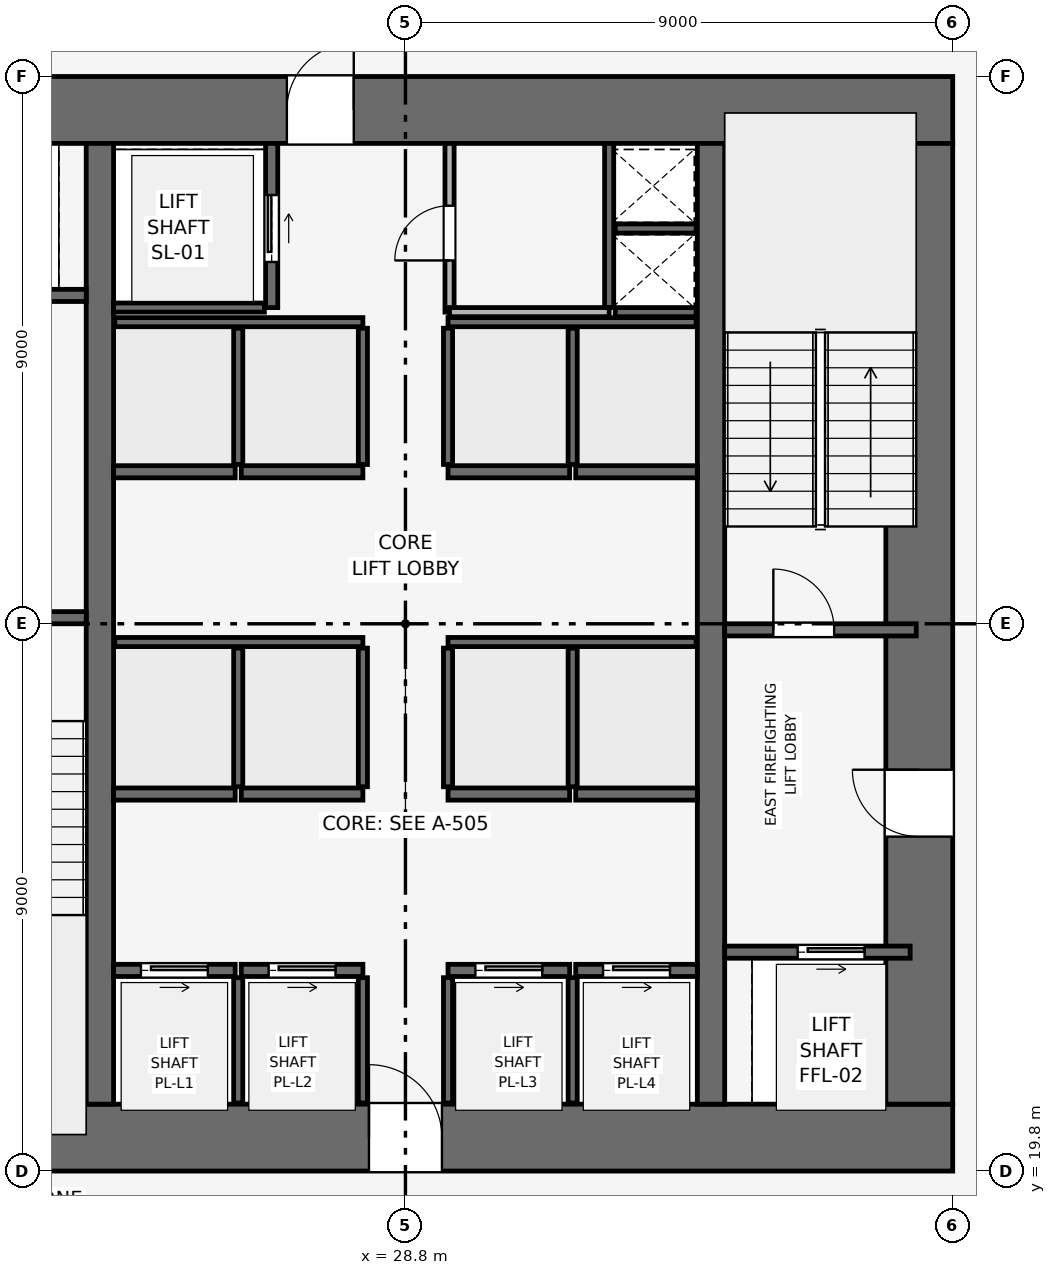
"""IFC4 building model, lengths in metres.
Left out: names, types, materials, properties, quantities, classifications, styles, units other than length and angle.
Written with IfcOpenShell. Run it as: python <this file> out.ifc"""

import sys

from ifc_helpers import new_model, si_unit, direction, frame, frame_2d, origin, place, context, subcontext, project, spatial, rectangle, extrude, element, fill, save


model = new_model("IFC4")
c1 = context("Model", 3, precision=1e-05, world=origin(), true_north=direction((0.0, 1.0)))
c2 = subcontext(c1, "Body", "Model", "MODEL_VIEW")
j1 = project(units=[si_unit("LENGTHUNIT", "METRE"), si_unit("PLANEANGLEUNIT", "RADIAN")], contexts=[c1])
p1 = place(None, origin())
s1 = spatial("IfcSite", under=j1, at=p1, CompositionType="ELEMENT")
p2 = place(p1, origin())
s2 = spatial("IfcBuilding", under=s1, at=p2, CompositionType="ELEMENT")
p3 = place(p2, frame((0.0, 0.0, 84.6)))
s3 = spatial("IfcBuildingStorey", under=s2, at=p3, CompositionType="ELEMENT", Elevation=84.6)
p4 = place(p3, frame((19.8, 20.35, 0.0), z_axis=(0.0, 0.0, 1.0), x_axis=(1.0, 0.0, 0.0)))
e1 = element("IfcWall", 1, at=p4, inside=s3, PredefinedType="SHEAR", context=c2, shape_type="SweptSolid", body=[
    extrude(rectangle(XDim=18.0, YDim=1.1, at=frame_2d((9.0, 0.0))), origin(), (0.0, 0.0, 1.0), 3.9),
])
p5 = place(p4, frame((8.4, 0.0, 0.0)))
e2 = element("IfcOpeningElement", 2, at=p5, cuts=e1, PredefinedType="OPENING", context=c2, shape_type="SweptSolid", body=[
    extrude(rectangle(XDim=1.2, YDim=2.2, at=frame_2d((0.6, 1.1))), frame((0.0, 0.56, 0.0), z_axis=(0.0, -1.0, 0.0), x_axis=(1.0, 0.0, 0.0)), (0.0, 0.0, 1.0), 1.12),
])
p6 = place(p3, frame((19.8, 37.25, 0.0), z_axis=(0.0, 0.0, 1.0), x_axis=(1.0, 0.0, 0.0)))
e3 = element("IfcWall", 3, at=p6, inside=s3, PredefinedType="SHEAR", context=c2, shape_type="SweptSolid", body=[
    extrude(rectangle(XDim=18.0, YDim=1.1, at=frame_2d((9.0, 0.0))), origin(), (0.0, 0.0, 1.0), 3.9),
])
p7 = place(p6, frame((7.05, 0.0, 0.0)))
e4 = element("IfcOpeningElement", 4, at=p7, cuts=e3, PredefinedType="OPENING", context=c2, shape_type="SweptSolid", body=[
    extrude(rectangle(XDim=1.1, YDim=2.15, at=frame_2d((0.55, 1.075))), frame((0.0, 0.56, 0.0), z_axis=(0.0, -1.0, 0.0), x_axis=(1.0, 0.0, 0.0)), (0.0, 0.0, 1.0), 1.12),
])
p8 = place(p3, frame((37.25, 20.9, 0.0), z_axis=(0.0, 0.0, 1.0), x_axis=(0.0, 1.0, 0.0)))
e5 = element("IfcWall", 5, at=p8, inside=s3, PredefinedType="SHEAR", context=c2, shape_type="SweptSolid", body=[
    extrude(rectangle(XDim=15.8, YDim=1.1, at=frame_2d((7.9, 0.0))), origin(), (0.0, 0.0, 1.0), 3.9),
])
p9 = place(p8, frame((4.4, 0.0, 0.0)))
e6 = element("IfcOpeningElement", 6, at=p9, cuts=e5, PredefinedType="OPENING", context=c2, shape_type="SweptSolid", body=[
    extrude(rectangle(XDim=1.1, YDim=2.15, at=frame_2d((0.55, 1.075))), frame((0.0, 0.56, 0.0), z_axis=(0.0, -1.0, 0.0), x_axis=(1.0, 0.0, 0.0)), (0.0, 0.0, 1.0), 1.12),
])
for number, where, z_axis, x_axis in (
    (7, (23.775, 20.9, 0.0), (0.0, 0.0, 1.0), (0.0, 1.0, 0.0)),
    (8, (33.825, 20.9, 0.0), (0.0, 0.0, 1.0), (0.0, 1.0, 0.0)),
):
    element("IfcWall", number, at=place(p3, frame(where, z_axis=z_axis, x_axis=x_axis)), inside=s3, PredefinedType="SHEAR", context=c2, shape_type="SweptSolid", body=[
        extrude(rectangle(XDim=15.8, YDim=0.45, at=frame_2d((7.9, 0.0))), origin(), (0.0, 0.0, 1.0), 3.9),
    ])
p10 = place(p3, frame((20.4, 28.9, 0.0), z_axis=(0.0, 0.0, 1.0), x_axis=(1.0, 0.0, 0.0)))
e9 = element("IfcWall", 9, at=p10, inside=s3, PredefinedType="SHEAR", context=c2, shape_type="SweptSolid", body=[
    extrude(rectangle(XDim=3.15, YDim=0.2, at=frame_2d((1.575, 0.0))), origin(), (0.0, 0.0, 1.0), 3.65),
])
p11 = place(p10, frame((0.8, 0.0, 0.0)))
e10 = element("IfcOpeningElement", 10, at=p11, cuts=e9, PredefinedType="OPENING", context=c2, shape_type="SweptSolid", body=[
    extrude(rectangle(XDim=1.0, YDim=2.1, at=frame_2d((0.5, 1.05))), frame((0.0, 0.11, 0.0), z_axis=(0.0, -1.0, 0.0), x_axis=(1.0, 0.0, 0.0)), (0.0, 0.0, 1.0), 0.22),
])
p12 = place(p3, frame((34.05, 28.7, 0.0), z_axis=(0.0, 0.0, 1.0), x_axis=(1.0, 0.0, 0.0)))
e11 = element("IfcWall", 11, at=p12, inside=s3, PredefinedType="SHEAR", context=c2, shape_type="SweptSolid", body=[
    extrude(rectangle(XDim=3.15, YDim=0.2, at=frame_2d((1.575, 0.0))), origin(), (0.0, 0.0, 1.0), 3.65),
])
p13 = place(p12, frame((0.8, 0.0, 0.0)))
e12 = element("IfcOpeningElement", 12, at=p13, cuts=e11, PredefinedType="OPENING", context=c2, shape_type="SweptSolid", body=[
    extrude(rectangle(XDim=1.0, YDim=2.1, at=frame_2d((0.5, 1.05))), frame((0.0, 0.11, 0.0), z_axis=(0.0, -1.0, 0.0), x_axis=(1.0, 0.0, 0.0)), (0.0, 0.0, 1.0), 0.22),
])
p14 = place(p3, frame((32.15, 34.0, 0.0), z_axis=(0.0, 0.0, 1.0), x_axis=(0.0, 1.0, 0.0)))
e13 = element("IfcWall", 13, at=p14, inside=s3, PredefinedType="SHEAR", context=c2, shape_type="SweptSolid", body=[
    extrude(rectangle(XDim=2.7, YDim=0.15, at=frame_2d((1.35, 0.0))), origin(), (0.0, 0.0, 1.0), 3.65),
])
for number, where, z_axis, x_axis in (
    (14, (32.25, 33.925, 0.0), (0.0, 0.0, 1.0), (1.0, 0.0, 0.0)),
    (15, (32.25, 35.3, 0.0), (0.0, 0.0, 1.0), (1.0, 0.0, 0.0)),
):
    element("IfcWall", number, at=place(p3, frame(where, z_axis=z_axis, x_axis=x_axis)), inside=s3, PredefinedType="SHEAR", context=c2, shape_type="SweptSolid", body=[
        extrude(rectangle(XDim=1.33, YDim=0.15, at=frame_2d((0.665, 0.0))), origin(), (0.0, 0.0, 1.0), 3.65),
    ])
p15 = place(p3, frame((20.5, 34.2, 0.0), z_axis=(0.0, 0.0, 1.0), x_axis=(1.0, 0.0, 0.0)))
e16 = element("IfcWall", 16, at=p15, inside=s3, PredefinedType="SHEAR", context=c2, shape_type="SweptSolid", body=[
    extrude(rectangle(XDim=3.05, YDim=0.2, at=frame_2d((1.525, 0.0))), origin(), (0.0, 0.0, 1.0), 3.65),
])
p16 = place(p15, frame((0.75, 0.0, 0.0)))
e17 = element("IfcOpeningElement", 17, at=p16, cuts=e16, PredefinedType="OPENING", context=c2, shape_type="SweptSolid", body=[
    extrude(rectangle(XDim=1.1, YDim=2.15, at=frame_2d((0.55, 1.075))), frame((0.0, 0.11, 0.0), z_axis=(0.0, -1.0, 0.0), x_axis=(1.0, 0.0, 0.0)), (0.0, 0.0, 1.0), 0.22),
])
p17 = place(p3, frame((34.05, 23.4, 0.0), z_axis=(0.0, 0.0, 1.0), x_axis=(1.0, 0.0, 0.0)))
e18 = element("IfcWall", 18, at=p17, inside=s3, PredefinedType="SHEAR", context=c2, shape_type="SweptSolid", body=[
    extrude(rectangle(XDim=3.05, YDim=0.2, at=frame_2d((1.525, 0.0))), origin(), (0.0, 0.0, 1.0), 3.65),
])
p18 = place(p17, frame((1.2, 0.0, 0.0)))
e19 = element("IfcOpeningElement", 19, at=p18, cuts=e18, PredefinedType="OPENING", context=c2, shape_type="SweptSolid", body=[
    extrude(rectangle(XDim=1.1, YDim=2.15, at=frame_2d((0.55, 1.075))), frame((0.0, 0.11, 0.0), z_axis=(0.0, -1.0, 0.0), x_axis=(1.0, 0.0, 0.0)), (0.0, 0.0, 1.0), 0.22),
])
p19 = place(p3, frame((26.6, 34.0, 0.0), z_axis=(0.0, 0.0, 1.0), x_axis=(0.0, 1.0, 0.0)))
e20 = element("IfcWall", 20, at=p19, inside=s3, PredefinedType="SHEAR", context=c2, shape_type="SweptSolid", body=[
    extrude(rectangle(XDim=2.7, YDim=0.2, at=frame_2d((1.35, 0.0))), origin(), (0.0, 0.0, 1.0), 3.65),
])
p20 = place(p19, frame((0.75, 0.0, 0.0)))
e21 = element("IfcOpeningElement", 21, at=p20, cuts=e20, PredefinedType="OPENING", context=c2, shape_type="SweptSolid", body=[
    extrude(rectangle(XDim=1.1, YDim=2.15, at=frame_2d((0.55, 1.075))), frame((0.0, 0.11, 0.0), z_axis=(0.0, -1.0, 0.0), x_axis=(1.0, 0.0, 0.0)), (0.0, 0.0, 1.0), 0.22),
])
p21 = place(p3, frame((24.0, 34.0, 0.0), z_axis=(0.0, 0.0, 1.0), x_axis=(1.0, 0.0, 0.0)))
e22 = element("IfcWall", 22, at=p21, inside=s3, PredefinedType="SHEAR", context=c2, shape_type="SweptSolid", body=[
    extrude(rectangle(XDim=2.48, YDim=0.15, at=frame_2d((1.24, 0.0))), origin(), (0.0, 0.0, 1.0), 3.65),
])
p22 = place(p3, frame((24.0, 23.1, 0.0), z_axis=(0.0, 0.0, 1.0), x_axis=(1.0, 0.0, 0.0)))
e23 = element("IfcWall", 23, at=p22, inside=s3, PredefinedType="SHEAR", context=c2, shape_type="SweptSolid", body=[
    extrude(rectangle(XDim=2.0, YDim=0.2, at=frame_2d((1.0, 0.0))), origin(), (0.0, 0.0, 1.0), 3.65),
])
p23 = place(p22, frame((0.45, 0.0, 0.0)))
e24 = element("IfcOpeningElement", 24, at=p23, cuts=e23, PredefinedType="OPENING", context=c2, shape_type="SweptSolid", body=[
    extrude(rectangle(XDim=1.1, YDim=2.15, at=frame_2d((0.55, 1.075))), frame((0.0, 0.11, 0.0), z_axis=(0.0, -1.0, 0.0), x_axis=(1.0, 0.0, 0.0)), (0.0, 0.0, 1.0), 0.22),
])
p24 = place(p3, frame((26.1, 23.1, 0.0), z_axis=(0.0, 0.0, 1.0), x_axis=(1.0, 0.0, 0.0)))
e25 = element("IfcWall", 25, at=p24, inside=s3, PredefinedType="SHEAR", context=c2, shape_type="SweptSolid", body=[
    extrude(rectangle(XDim=2.0, YDim=0.2, at=frame_2d((1.0, 0.0))), origin(), (0.0, 0.0, 1.0), 3.65),
])
p25 = place(p24, frame((0.45, 0.0, 0.0)))
e26 = element("IfcOpeningElement", 26, at=p25, cuts=e25, PredefinedType="OPENING", context=c2, shape_type="SweptSolid", body=[
    extrude(rectangle(XDim=1.1, YDim=2.15, at=frame_2d((0.55, 1.075))), frame((0.0, 0.11, 0.0), z_axis=(0.0, -1.0, 0.0), x_axis=(1.0, 0.0, 0.0)), (0.0, 0.0, 1.0), 0.22),
])
p26 = place(p3, frame((29.5, 23.1, 0.0), z_axis=(0.0, 0.0, 1.0), x_axis=(1.0, 0.0, 0.0)))
e27 = element("IfcWall", 27, at=p26, inside=s3, PredefinedType="SHEAR", context=c2, shape_type="SweptSolid", body=[
    extrude(rectangle(XDim=2.0, YDim=0.2, at=frame_2d((1.0, 0.0))), origin(), (0.0, 0.0, 1.0), 3.65),
])
p27 = place(p26, frame((0.45, 0.0, 0.0)))
e28 = element("IfcOpeningElement", 28, at=p27, cuts=e27, PredefinedType="OPENING", context=c2, shape_type="SweptSolid", body=[
    extrude(rectangle(XDim=1.1, YDim=2.15, at=frame_2d((0.55, 1.075))), frame((0.0, 0.11, 0.0), z_axis=(0.0, -1.0, 0.0), x_axis=(1.0, 0.0, 0.0)), (0.0, 0.0, 1.0), 0.22),
])
p28 = place(p3, frame((31.6, 23.1, 0.0), z_axis=(0.0, 0.0, 1.0), x_axis=(1.0, 0.0, 0.0)))
e29 = element("IfcWall", 29, at=p28, inside=s3, PredefinedType="SHEAR", context=c2, shape_type="SweptSolid", body=[
    extrude(rectangle(XDim=2.0, YDim=0.2, at=frame_2d((1.0, 0.0))), origin(), (0.0, 0.0, 1.0), 3.65),
])
p29 = place(p28, frame((0.45, 0.0, 0.0)))
e30 = element("IfcOpeningElement", 30, at=p29, cuts=e29, PredefinedType="OPENING", context=c2, shape_type="SweptSolid", body=[
    extrude(rectangle(XDim=1.1, YDim=2.15, at=frame_2d((0.55, 1.075))), frame((0.0, 0.11, 0.0), z_axis=(0.0, -1.0, 0.0), x_axis=(1.0, 0.0, 0.0)), (0.0, 0.0, 1.0), 0.22),
])
for number, where, z_axis, x_axis in (
    (31, (24.0, 26.0, 0.0), (0.0, 0.0, 1.0), (1.0, 0.0, 0.0)),
    (32, (26.1, 26.0, 0.0), (0.0, 0.0, 1.0), (1.0, 0.0, 0.0)),
    (33, (29.5, 26.0, 0.0), (0.0, 0.0, 1.0), (1.0, 0.0, 0.0)),
    (34, (31.6, 26.0, 0.0), (0.0, 0.0, 1.0), (1.0, 0.0, 0.0)),
    (35, (24.0, 31.3, 0.0), (0.0, 0.0, 1.0), (1.0, 0.0, 0.0)),
    (36, (26.1, 31.3, 0.0), (0.0, 0.0, 1.0), (1.0, 0.0, 0.0)),
    (37, (29.5, 31.3, 0.0), (0.0, 0.0, 1.0), (1.0, 0.0, 0.0)),
    (38, (31.6, 31.3, 0.0), (0.0, 0.0, 1.0), (1.0, 0.0, 0.0)),
):
    element("IfcWall", number, at=place(p3, frame(where, z_axis=z_axis, x_axis=x_axis)), inside=s3, PredefinedType="SHEAR", context=c2, shape_type="SweptSolid", body=[
        extrude(rectangle(XDim=2.0, YDim=0.2, at=frame_2d((1.0, 0.0))), origin(), (0.0, 0.0, 1.0), 3.65),
    ])
for number, where, z_axis, x_axis in (
    (39, (26.05, 20.92, 0.0), (0.0, 0.0, 1.0), (0.0, 1.0, 0.0)),
    (40, (28.1, 20.92, 0.0), (0.0, 0.0, 1.0), (0.0, 1.0, 0.0)),
    (41, (29.5, 20.92, 0.0), (0.0, 0.0, 1.0), (0.0, 1.0, 0.0)),
    (42, (31.55, 20.92, 0.0), (0.0, 0.0, 1.0), (0.0, 1.0, 0.0)),
):
    element("IfcWall", number, at=place(p3, frame(where, z_axis=z_axis, x_axis=x_axis)), inside=s3, PredefinedType="SHEAR", context=c2, shape_type="SweptSolid", body=[
        extrude(rectangle(XDim=2.06, YDim=0.15, at=frame_2d((1.03, 0.0))), origin(), (0.0, 0.0, 1.0), 3.65),
    ])
for number, where, z_axis, x_axis in (
    (43, (24.02, 28.5, 0.0), (0.0, 0.0, 1.0), (1.0, 0.0, 0.0)),
    (44, (29.5, 28.5, 0.0), (0.0, 0.0, 1.0), (1.0, 0.0, 0.0)),
):
    element("IfcWall", number, at=place(p3, frame(where, z_axis=z_axis, x_axis=x_axis)), inside=s3, PredefinedType="SHEAR", context=c2, shape_type="SweptSolid", body=[
        extrude(rectangle(XDim=4.08, YDim=0.15, at=frame_2d((2.04, 0.0))), origin(), (0.0, 0.0, 1.0), 3.65),
    ])
for number, where, z_axis, x_axis in (
    (45, (26.05, 26.12, 0.0), (0.0, 0.0, 1.0), (0.0, 1.0, 0.0)),
    (46, (28.1, 26.12, 0.0), (0.0, 0.0, 1.0), (0.0, 1.0, 0.0)),
    (47, (29.5, 26.12, 0.0), (0.0, 0.0, 1.0), (0.0, 1.0, 0.0)),
    (48, (31.55, 26.12, 0.0), (0.0, 0.0, 1.0), (0.0, 1.0, 0.0)),
):
    element("IfcWall", number, at=place(p3, frame(where, z_axis=z_axis, x_axis=x_axis)), inside=s3, PredefinedType="SHEAR", context=c2, shape_type="SweptSolid", body=[
        extrude(rectangle(XDim=2.28, YDim=0.15, at=frame_2d((1.14, 0.0))), origin(), (0.0, 0.0, 1.0), 3.65),
    ])
for number, where, z_axis, x_axis in (
    (49, (24.02, 33.76, 0.0), (0.0, 0.0, 1.0), (1.0, 0.0, 0.0)),
    (50, (29.5, 33.76, 0.0), (0.0, 0.0, 1.0), (1.0, 0.0, 0.0)),
):
    element("IfcWall", number, at=place(p3, frame(where, z_axis=z_axis, x_axis=x_axis)), inside=s3, PredefinedType="SHEAR", context=c2, shape_type="SweptSolid", body=[
        extrude(rectangle(XDim=4.08, YDim=0.15, at=frame_2d((2.04, 0.0))), origin(), (0.0, 0.0, 1.0), 3.65),
    ])
for number, where, z_axis, x_axis in (
    (51, (26.05, 31.42, 0.0), (0.0, 0.0, 1.0), (0.0, 1.0, 0.0)),
    (52, (28.1, 31.42, 0.0), (0.0, 0.0, 1.0), (0.0, 1.0, 0.0)),
    (53, (29.5, 31.42, 0.0), (0.0, 0.0, 1.0), (0.0, 1.0, 0.0)),
    (54, (31.55, 31.42, 0.0), (0.0, 0.0, 1.0), (0.0, 1.0, 0.0)),
):
    element("IfcWall", number, at=place(p3, frame(where, z_axis=z_axis, x_axis=x_axis)), inside=s3, PredefinedType="SHEAR", context=c2, shape_type="SweptSolid", body=[
        extrude(rectangle(XDim=2.24, YDim=0.15, at=frame_2d((1.12, 0.0))), origin(), (0.0, 0.0, 1.0), 3.65),
    ])
p30 = place(p3, frame((29.525, 33.925, 0.0), z_axis=(0.0, 0.0, 1.0), x_axis=(0.0, 1.0, 0.0)))
e55 = element("IfcWall", 55, at=p30, inside=s3, PredefinedType="PARTITIONING", context=c2, shape_type="SweptSolid", body=[
    extrude(rectangle(XDim=2.775, YDim=0.15, at=frame_2d((1.387, 0.0))), origin(), (0.0, 0.0, 1.0), 3.65),
])
p31 = place(p30, frame((0.85, 0.0, 0.0)))
e56 = element("IfcOpeningElement", 56, at=p31, cuts=e55, PredefinedType="OPENING", context=c2, shape_type="SweptSolid", body=[
    extrude(rectangle(XDim=0.9, YDim=2.1, at=frame_2d((0.45, 1.05))), frame((0.0, 0.085, 0.0), z_axis=(0.0, -1.0, 0.0), x_axis=(1.0, 0.0, 0.0)), (0.0, 0.0, 1.0), 0.17),
])
p32 = place(p3, frame((29.525, 33.925, 0.0), z_axis=(0.0, 0.0, 1.0), x_axis=(1.0, 0.0, 0.0)))
e57 = element("IfcWall", 57, at=p32, inside=s3, PredefinedType="PARTITIONING", context=c2, shape_type="SweptSolid", body=[
    extrude(rectangle(XDim=2.625, YDim=0.15, at=frame_2d((1.312, 0.0))), origin(), (0.0, 0.0, 1.0), 3.65),
])
p33 = place(p13, origin())
e58 = element("IfcDoor", 58, at=p33, inside=s3, OperationType="SINGLE_SWING_LEFT", PredefinedType="DOOR", context=c2, shape_type="SweptSolid", body=[
    extrude(rectangle(XDim=1.0, YDim=2.1, at=frame_2d((0.5, 1.05))), frame((0.0, 0.025, 0.0), z_axis=(0.0, -1.0, 0.0), x_axis=(1.0, 0.0, 0.0)), (0.0, 0.0, 1.0), 0.05),
])
fill(e12, e58)
p34 = place(p18, origin())
e59 = element("IfcDoor", 59, at=p34, inside=s3, OperationType="SLIDING_TO_RIGHT", PredefinedType="DOOR", context=c2, shape_type="SweptSolid", body=[
    extrude(rectangle(XDim=1.1, YDim=2.15, at=frame_2d((0.55, 1.075))), frame((0.0, 0.025, 0.0), z_axis=(0.0, -1.0, 0.0), x_axis=(1.0, 0.0, 0.0)), (0.0, 0.0, 1.0), 0.05),
])
fill(e19, e59)
p35 = place(p20, origin())
e60 = element("IfcDoor", 60, at=p35, inside=s3, OperationType="SLIDING_TO_RIGHT", PredefinedType="DOOR", context=c2, shape_type="SweptSolid", body=[
    extrude(rectangle(XDim=1.1, YDim=2.15, at=frame_2d((0.55, 1.075))), frame((0.0, 0.025, 0.0), z_axis=(0.0, -1.0, 0.0), x_axis=(1.0, 0.0, 0.0)), (0.0, 0.0, 1.0), 0.05),
])
fill(e21, e60)
p36 = place(p23, origin())
e61 = element("IfcDoor", 61, at=p36, inside=s3, OperationType="SLIDING_TO_RIGHT", PredefinedType="DOOR", context=c2, shape_type="SweptSolid", body=[
    extrude(rectangle(XDim=1.1, YDim=2.15, at=frame_2d((0.55, 1.075))), frame((0.0, 0.025, 0.0), z_axis=(0.0, -1.0, 0.0), x_axis=(1.0, 0.0, 0.0)), (0.0, 0.0, 1.0), 0.05),
])
fill(e24, e61)
p37 = place(p25, origin())
e62 = element("IfcDoor", 62, at=p37, inside=s3, OperationType="SLIDING_TO_RIGHT", PredefinedType="DOOR", context=c2, shape_type="SweptSolid", body=[
    extrude(rectangle(XDim=1.1, YDim=2.15, at=frame_2d((0.55, 1.075))), frame((0.0, 0.025, 0.0), z_axis=(0.0, -1.0, 0.0), x_axis=(1.0, 0.0, 0.0)), (0.0, 0.0, 1.0), 0.05),
])
fill(e26, e62)
p38 = place(p27, origin())
e63 = element("IfcDoor", 63, at=p38, inside=s3, OperationType="SLIDING_TO_RIGHT", PredefinedType="DOOR", context=c2, shape_type="SweptSolid", body=[
    extrude(rectangle(XDim=1.1, YDim=2.15, at=frame_2d((0.55, 1.075))), frame((0.0, 0.025, 0.0), z_axis=(0.0, -1.0, 0.0), x_axis=(1.0, 0.0, 0.0)), (0.0, 0.0, 1.0), 0.05),
])
fill(e28, e63)
p39 = place(p29, origin())
e64 = element("IfcDoor", 64, at=p39, inside=s3, OperationType="SLIDING_TO_RIGHT", PredefinedType="DOOR", context=c2, shape_type="SweptSolid", body=[
    extrude(rectangle(XDim=1.1, YDim=2.15, at=frame_2d((0.55, 1.075))), frame((0.0, 0.025, 0.0), z_axis=(0.0, -1.0, 0.0), x_axis=(1.0, 0.0, 0.0)), (0.0, 0.0, 1.0), 0.05),
])
fill(e30, e64)
p40 = place(p31, origin())
e65 = element("IfcDoor", 65, at=p40, inside=s3, OperationType="SINGLE_SWING_LEFT", PredefinedType="DOOR", context=c2, shape_type="SweptSolid", body=[
    extrude(rectangle(XDim=0.9, YDim=2.1, at=frame_2d((0.45, 1.05))), frame((0.0, 0.025, 0.0), z_axis=(0.0, -1.0, 0.0), x_axis=(1.0, 0.0, 0.0)), (0.0, 0.0, 1.0), 0.05),
])
fill(e56, e65)
p41 = place(p9, origin())
e66 = element("IfcDoor", 66, at=p41, inside=s3, OperationType="SINGLE_SWING_RIGHT", PredefinedType="DOOR", context=c2, shape_type="SweptSolid", body=[
    extrude(rectangle(XDim=1.1, YDim=2.15, at=frame_2d((0.55, 1.075))), frame((0.0, 0.025, 0.0), z_axis=(0.0, -1.0, 0.0), x_axis=(1.0, 0.0, 0.0)), (0.0, 0.0, 1.0), 0.05),
])
fill(e6, e66)
p42 = place(p5, origin())
e67 = element("IfcDoor", 67, at=p42, inside=s3, OperationType="SINGLE_SWING_LEFT", PredefinedType="DOOR", context=c2, shape_type="SweptSolid", body=[
    extrude(rectangle(XDim=1.2, YDim=2.2, at=frame_2d((0.6, 1.1))), frame((0.0, 0.025, 0.0), z_axis=(0.0, -1.0, 0.0), x_axis=(1.0, 0.0, 0.0)), (0.0, 0.0, 1.0), 0.05),
])
fill(e2, e67)
p43 = place(p7, origin())
e68 = element("IfcDoor", 68, at=p43, inside=s3, OperationType="SINGLE_SWING_RIGHT", PredefinedType="DOOR", context=c2, shape_type="SweptSolid", body=[
    extrude(rectangle(XDim=1.1, YDim=2.15, at=frame_2d((0.55, 1.075))), frame((0.0, 0.025, 0.0), z_axis=(0.0, -1.0, 0.0), x_axis=(1.0, 0.0, 0.0)), (0.0, 0.0, 1.0), 0.05),
])
fill(e4, e68)
save(model, sys.argv[1])
